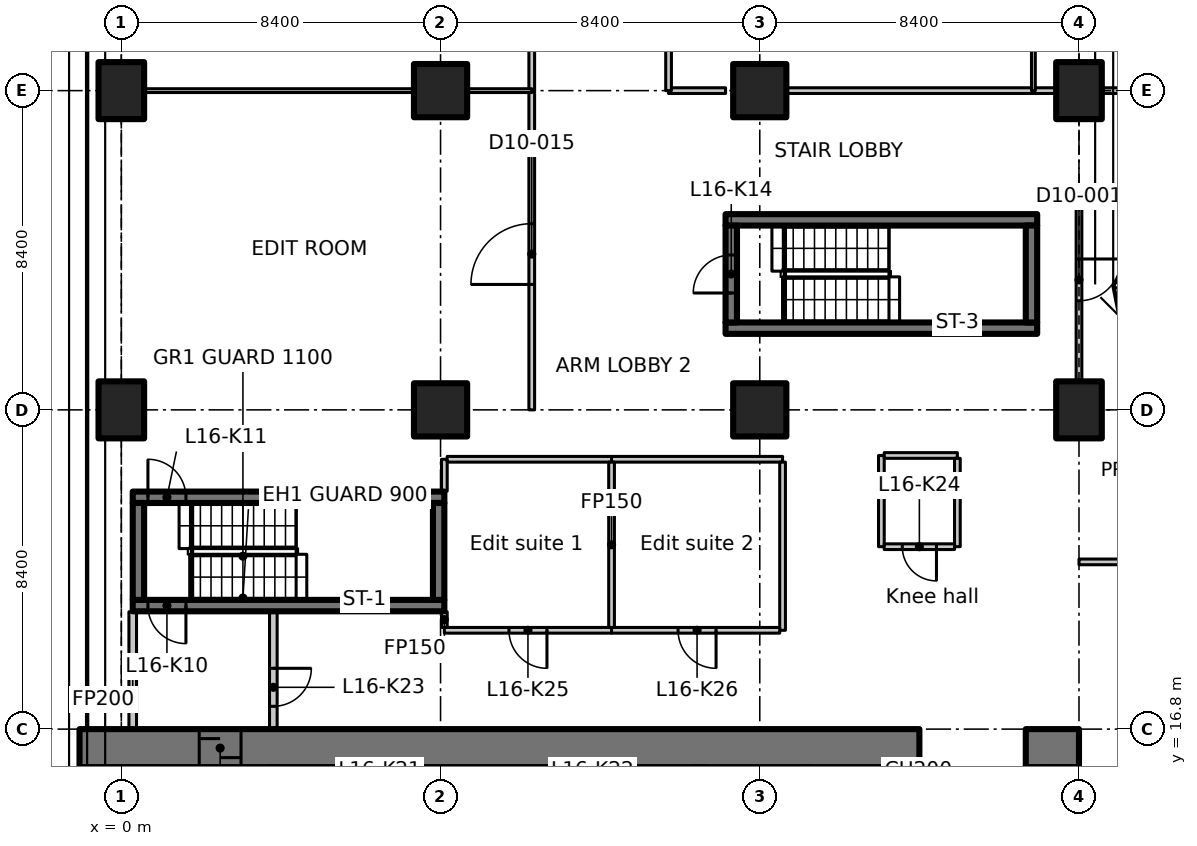
"""IFC4 building model, lengths in metres.
Left out: names, types, materials, properties, quantities, classifications, styles, units other than length and angle.
Written with IfcOpenShell. Run it as: python <this file> out.ifc"""

import sys

from ifc_helpers import new_model, si_unit, direction, frame, frame_2d, origin, origin_2d, place, context, subcontext, project, spatial, polyline, rectangle, outline, extrude, element, fill, save


model = new_model("IFC4")
c1 = context("Model", 3, precision=1e-05, world=origin(), true_north=direction((0.0, 1.0)))
c2 = subcontext(c1, "Body", "Model", "MODEL_VIEW")
j1 = project(units=[si_unit("LENGTHUNIT", "METRE"), si_unit("PLANEANGLEUNIT", "RADIAN")], contexts=[c1])
p1 = place(None, origin())
s1 = spatial("IfcSite", under=j1, at=p1, CompositionType="ELEMENT")
p2 = place(p1, origin())
s2 = spatial("IfcBuilding", under=s1, at=p2, CompositionType="ELEMENT")
p3 = place(p2, frame((0.0, 0.0, 72.5)))
s3 = spatial("IfcBuildingStorey", under=s2, at=p3, CompositionType="ELEMENT", Elevation=72.5)
for number, where, z_axis, x_axis in (
    (1, (0.0, 25.2, 0.0), (0.0, 0.0, 1.0), (1.0, 0.0, 0.0)),
    (2, (0.0, 33.6, 0.0), (0.0, 0.0, 1.0), (1.0, 0.0, 0.0)),
):
    element("IfcColumn", number, at=place(p3, frame(where, z_axis=z_axis, x_axis=x_axis)), inside=s3, PredefinedType="COLUMN", context=c2, shape_type="SweptSolid", body=[
        extrude(rectangle(XDim=1.2, YDim=1.5, at=origin_2d()), origin(), (0.0, 0.0, 1.0), 3.35),
    ])
for number, where, z_axis, x_axis in (
    (3, (8.4, 25.2, 0.0), (0.0, 0.0, 1.0), (1.0, 0.0, 0.0)),
    (4, (8.4, 33.6, 0.0), (0.0, 0.0, 1.0), (1.0, 0.0, 0.0)),
    (5, (16.8, 25.2, 0.0), (0.0, 0.0, 1.0), (1.0, 0.0, 0.0)),
    (6, (16.8, 33.6, 0.0), (0.0, 0.0, 1.0), (1.0, 0.0, 0.0)),
):
    element("IfcColumn", number, at=place(p3, frame(where, z_axis=z_axis, x_axis=x_axis)), inside=s3, PredefinedType="COLUMN", context=c2, shape_type="SweptSolid", body=[
        extrude(rectangle(XDim=1.4, YDim=1.4, at=origin_2d()), origin(), (0.0, 0.0, 1.0), 3.35),
    ])
for number, where, z_axis, x_axis in (
    (7, (25.2, 25.2, 0.0), (0.0, 0.0, 1.0), (1.0, 0.0, 0.0)),
    (8, (25.2, 33.6, 0.0), (0.0, 0.0, 1.0), (1.0, 0.0, 0.0)),
):
    element("IfcColumn", number, at=place(p3, frame(where, z_axis=z_axis, x_axis=x_axis)), inside=s3, PredefinedType="COLUMN", context=c2, shape_type="SweptSolid", body=[
        extrude(rectangle(XDim=1.2, YDim=1.5, at=origin_2d()), origin(), (0.0, 0.0, 1.0), 3.35),
    ])
p4 = place(p3, frame((-1.1, 16.3, 0.0), z_axis=(0.0, 0.0, 1.0), x_axis=(1.0, 0.0, 0.0)))
e9 = element("IfcWall", 9, at=p4, inside=s3, PredefinedType="SHEAR", context=c2, shape_type="SweptSolid", body=[
    extrude(rectangle(XDim=22.1, YDim=1.0, at=frame_2d((11.05, 0.0))), origin(), (0.0, 0.0, 1.0), 3.35),
])
p5 = place(p4, frame((3.15, 0.0, 0.0)))
e10 = element("IfcOpeningElement", 10, at=p5, cuts=e9, PredefinedType="OPENING", context=c2, shape_type="SweptSolid", body=[
    extrude(rectangle(XDim=1.1, YDim=2.3, at=frame_2d((0.55, 1.15))), frame((0.0, 0.51, 0.0), z_axis=(0.0, -1.0, 0.0), x_axis=(1.0, 0.0, 0.0)), (0.0, 0.0, 1.0), 1.02),
])
p6 = place(p3, frame((23.8, 16.3, 0.0), z_axis=(0.0, 0.0, 1.0), x_axis=(1.0, 0.0, 0.0)))
e11 = element("IfcWall", 11, at=p6, inside=s3, PredefinedType="SHEAR", context=c2, shape_type="SweptSolid", body=[
    extrude(rectangle(XDim=1.4, YDim=1.0, at=frame_2d((0.7, 0.0))), origin(), (0.0, 0.0, 1.0), 3.35),
])
p7 = place(p3, frame((24.7, 12.6, 0.0), z_axis=(0.0, 0.0, 1.0), x_axis=(0.0, 1.0, 0.0)))
e12 = element("IfcWall", 12, at=p7, inside=s3, PredefinedType="SHEAR", context=c2, shape_type="SweptSolid", body=[
    extrude(rectangle(XDim=3.2, YDim=1.0, at=frame_2d((1.6, 0.0))), origin(), (0.0, 0.0, 1.0), 3.35),
])
p8 = place(p3, frame((8.5, 20.05, 0.0), z_axis=(0.0, 0.0, 1.0), x_axis=(-1.0, 0.0, 0.0)))
e13 = element("IfcWall", 13, at=p8, inside=s3, PredefinedType="SHEAR", context=c2, shape_type="SweptSolid", body=[
    extrude(rectangle(XDim=8.2, YDim=0.3, at=frame_2d((4.1, 0.0))), origin(), (0.0, 0.0, 1.0), 3.35),
])
p9 = place(p8, frame((6.8, 0.0, 0.0)))
e14 = element("IfcOpeningElement", 14, at=p9, cuts=e13, PredefinedType="OPENING", context=c2, shape_type="SweptSolid", body=[
    extrude(rectangle(XDim=1.0, YDim=2.1, at=frame_2d((0.5, 1.05))), frame((0.0, 0.16, 0.0), z_axis=(0.0, -1.0, 0.0), x_axis=(1.0, 0.0, 0.0)), (0.0, 0.0, 1.0), 0.32),
])
p10 = place(p3, frame((0.3, 22.9, 0.0), z_axis=(0.0, 0.0, 1.0), x_axis=(1.0, 0.0, 0.0)))
e15 = element("IfcWall", 15, at=p10, inside=s3, PredefinedType="SHEAR", context=c2, shape_type="SweptSolid", body=[
    extrude(rectangle(XDim=8.2, YDim=0.3, at=frame_2d((4.1, 0.0))), origin(), (0.0, 0.0, 1.0), 3.35),
])
p11 = place(p10, frame((0.4, 0.0, 0.0)))
e16 = element("IfcOpeningElement", 16, at=p11, cuts=e15, PredefinedType="OPENING", context=c2, shape_type="SweptSolid", body=[
    extrude(rectangle(XDim=1.0, YDim=2.1, at=frame_2d((0.5, 1.05))), frame((0.0, 0.16, 0.0), z_axis=(0.0, -1.0, 0.0), x_axis=(1.0, 0.0, 0.0)), (0.0, 0.0, 1.0), 0.32),
])
for number, where, z_axis, x_axis in (
    (17, (0.45, 20.2, 0.0), (0.0, 0.0, 1.0), (0.0, 1.0, 0.0)),
    (18, (8.35, 20.2, 0.0), (0.0, 0.0, 1.0), (0.0, 1.0, 0.0)),
):
    element("IfcWall", number, at=place(p3, frame(where, z_axis=z_axis, x_axis=x_axis)), inside=s3, PredefinedType="SHEAR", context=c2, shape_type="SweptSolid", body=[
        extrude(rectangle(XDim=2.55, YDim=0.3, at=frame_2d((1.275, 0.0))), origin(), (0.0, 0.0, 1.0), 3.35),
    ])
for number, where, z_axis, x_axis in (
    (19, (15.9, 27.35, 0.0), (0.0, 0.0, 1.0), (1.0, 0.0, 0.0)),
    (20, (15.9, 30.2, 0.0), (0.0, 0.0, 1.0), (1.0, 0.0, 0.0)),
):
    element("IfcWall", number, at=place(p3, frame(where, z_axis=z_axis, x_axis=x_axis)), inside=s3, PredefinedType="SHEAR", context=c2, shape_type="SweptSolid", body=[
        extrude(rectangle(XDim=8.2, YDim=0.3, at=frame_2d((4.1, 0.0))), origin(), (0.0, 0.0, 1.0), 3.35),
    ])
p12 = place(p3, frame((16.05, 27.5, 0.0), z_axis=(0.0, 0.0, 1.0), x_axis=(0.0, 1.0, 0.0)))
e21 = element("IfcWall", 21, at=p12, inside=s3, PredefinedType="SHEAR", context=c2, shape_type="SweptSolid", body=[
    extrude(rectangle(XDim=2.55, YDim=0.3, at=frame_2d((1.275, 0.0))), origin(), (0.0, 0.0, 1.0), 3.35),
])
p13 = place(p12, frame((0.775, 0.0, 0.0)))
e22 = element("IfcOpeningElement", 22, at=p13, cuts=e21, PredefinedType="OPENING", context=c2, shape_type="SweptSolid", body=[
    extrude(rectangle(XDim=1.0, YDim=2.1, at=frame_2d((0.5, 1.05))), frame((0.0, 0.16, 0.0), z_axis=(0.0, -1.0, 0.0), x_axis=(1.0, 0.0, 0.0)), (0.0, 0.0, 1.0), 0.32),
])
p14 = place(p3, frame((23.95, 27.5, 0.0), z_axis=(0.0, 0.0, 1.0), x_axis=(0.0, 1.0, 0.0)))
e23 = element("IfcWall", 23, at=p14, inside=s3, PredefinedType="SHEAR", context=c2, shape_type="SweptSolid", body=[
    extrude(rectangle(XDim=2.55, YDim=0.3, at=frame_2d((1.275, 0.0))), origin(), (0.0, 0.0, 1.0), 3.35),
])
p15 = place(p3, frame((0.3, 16.812, 0.0), z_axis=(0.0, 0.0, 1.0), x_axis=(0.0, 1.0, 0.0)))
e24 = element("IfcWall", 24, at=p15, inside=s3, PredefinedType="PARTITIONING", context=c2, shape_type="SweptSolid", body=[
    extrude(rectangle(XDim=3.076, YDim=0.2, at=frame_2d((1.538, 0.0))), origin(), (0.0, 0.0, 1.0), 2.98),
])
p16 = place(p3, frame((4.0, 19.888, 0.0), z_axis=(0.0, 0.0, 1.0), x_axis=(0.0, -1.0, 0.0)))
e25 = element("IfcWall", 25, at=p16, inside=s3, PredefinedType="PARTITIONING", context=c2, shape_type="SweptSolid", body=[
    extrude(rectangle(XDim=3.076, YDim=0.2, at=frame_2d((1.538, 0.0))), origin(), (0.0, 0.0, 1.0), 3.35),
])
p17 = place(p16, frame((1.488, 0.0, 0.0)))
e26 = element("IfcOpeningElement", 26, at=p17, cuts=e25, PredefinedType="OPENING", context=c2, shape_type="SweptSolid", body=[
    extrude(rectangle(XDim=1.0, YDim=2.1, at=frame_2d((0.5, 1.05))), frame((0.0, 0.11, 0.0), z_axis=(0.0, -1.0, 0.0), x_axis=(1.0, 0.0, 0.0)), (0.0, 0.0, 1.0), 0.22),
])
p18 = place(p3, frame((12.9, 19.4, 0.0), z_axis=(0.0, 0.0, 1.0), x_axis=(-1.0, 0.0, 0.0)))
e27 = element("IfcWall", 27, at=p18, inside=s3, PredefinedType="PARTITIONING", context=c2, shape_type="SweptSolid", body=[
    extrude(rectangle(XDim=4.4, YDim=0.15, at=frame_2d((2.2, 0.0))), origin(), (0.0, 0.0, 1.0), 3.35),
])
p19 = place(p18, frame((1.7, 0.0, 0.0)))
e28 = element("IfcOpeningElement", 28, at=p19, cuts=e27, PredefinedType="OPENING", context=c2, shape_type="SweptSolid", body=[
    extrude(rectangle(XDim=1.0, YDim=2.1, at=frame_2d((0.5, 1.05))), frame((0.0, 0.085, 0.0), z_axis=(0.0, -1.0, 0.0), x_axis=(1.0, 0.0, 0.0)), (0.0, 0.0, 1.0), 0.17),
])
p20 = place(p3, frame((8.5, 19.475, 0.0), z_axis=(0.0, 0.0, 1.0), x_axis=(0.0, 1.0, 0.0)))
e29 = element("IfcWall", 29, at=p20, inside=s3, PredefinedType="PARTITIONING", context=c2, shape_type="SweptSolid", body=[
    extrude(rectangle(XDim=0.413, YDim=0.15, at=frame_2d((0.207, 0.0))), origin(), (0.0, 0.0, 1.0), 3.35),
])
p21 = place(p3, frame((8.5, 23.062, 0.0), z_axis=(0.0, 0.0, 1.0), x_axis=(0.0, 1.0, 0.0)))
e30 = element("IfcWall", 30, at=p21, inside=s3, PredefinedType="PARTITIONING", context=c2, shape_type="SweptSolid", body=[
    extrude(rectangle(XDim=0.838, YDim=0.15, at=frame_2d((0.419, 0.0))), origin(), (0.0, 0.0, 1.0), 3.35),
])
p22 = place(p3, frame((8.575, 23.9, 0.0), z_axis=(0.0, 0.0, 1.0), x_axis=(1.0, 0.0, 0.0)))
e31 = element("IfcWall", 31, at=p22, inside=s3, PredefinedType="PARTITIONING", context=c2, shape_type="SweptSolid", body=[
    extrude(rectangle(XDim=4.325, YDim=0.15, at=frame_2d((2.163, 0.0))), origin(), (0.0, 0.0, 1.0), 3.35),
])
p23 = place(p3, frame((12.9, 23.9, 0.0), z_axis=(0.0, 0.0, 1.0), x_axis=(1.0, 0.0, 0.0)))
e32 = element("IfcWall", 32, at=p23, inside=s3, PredefinedType="PARTITIONING", context=c2, shape_type="SweptSolid", body=[
    extrude(rectangle(XDim=4.5, YDim=0.15, at=frame_2d((2.25, 0.0))), origin(), (0.0, 0.0, 1.0), 3.35),
])
p24 = place(p3, frame((17.4, 23.825, 0.0), z_axis=(0.0, 0.0, 1.0), x_axis=(0.0, -1.0, 0.0)))
e33 = element("IfcWall", 33, at=p24, inside=s3, PredefinedType="PARTITIONING", context=c2, shape_type="SweptSolid", body=[
    extrude(rectangle(XDim=4.425, YDim=0.15, at=frame_2d((2.212, 0.0))), origin(), (0.0, 0.0, 1.0), 3.35),
])
p25 = place(p3, frame((17.325, 19.4, 0.0), z_axis=(0.0, 0.0, 1.0), x_axis=(-1.0, 0.0, 0.0)))
e34 = element("IfcWall", 34, at=p25, inside=s3, PredefinedType="PARTITIONING", context=c2, shape_type="SweptSolid", body=[
    extrude(rectangle(XDim=4.425, YDim=0.15, at=frame_2d((2.212, 0.0))), origin(), (0.0, 0.0, 1.0), 3.35),
])
p26 = place(p25, frame((1.675, 0.0, 0.0)))
e35 = element("IfcOpeningElement", 35, at=p26, cuts=e34, PredefinedType="OPENING", context=c2, shape_type="SweptSolid", body=[
    extrude(rectangle(XDim=1.0, YDim=2.1, at=frame_2d((0.5, 1.05))), frame((0.0, 0.085, 0.0), z_axis=(0.0, -1.0, 0.0), x_axis=(1.0, 0.0, 0.0)), (0.0, 0.0, 1.0), 0.17),
])
p27 = place(p3, frame((12.9, 23.825, 0.0), z_axis=(0.0, 0.0, 1.0), x_axis=(0.0, -1.0, 0.0)))
e36 = element("IfcWall", 36, at=p27, inside=s3, PredefinedType="PARTITIONING", context=c2, shape_type="SweptSolid", body=[
    extrude(rectangle(XDim=4.35, YDim=0.15, at=frame_2d((2.175, 0.0))), origin(), (0.0, 0.0, 1.0), 3.35),
])
p28 = place(p3, frame((20.0, 21.6, 0.0), z_axis=(0.0, 0.0, 1.0), x_axis=(0.0, 1.0, 0.0)))
e37 = element("IfcWall", 37, at=p28, inside=s3, PredefinedType="PARTITIONING", context=c2, shape_type="SweptSolid", body=[
    extrude(rectangle(XDim=2.4, YDim=0.15, at=frame_2d((1.2, 0.0))), origin(), (0.0, 0.0, 1.0), 3.35),
])
p29 = place(p3, frame((20.075, 24.0, 0.0), z_axis=(0.0, 0.0, 1.0), x_axis=(1.0, 0.0, 0.0)))
e38 = element("IfcWall", 38, at=p29, inside=s3, PredefinedType="PARTITIONING", context=c2, shape_type="SweptSolid", body=[
    extrude(rectangle(XDim=1.925, YDim=0.15, at=frame_2d((0.962, 0.0))), origin(), (0.0, 0.0, 1.0), 3.35),
])
p30 = place(p3, frame((22.0, 23.925, 0.0), z_axis=(0.0, 0.0, 1.0), x_axis=(0.0, -1.0, 0.0)))
e39 = element("IfcWall", 39, at=p30, inside=s3, PredefinedType="PARTITIONING", context=c2, shape_type="SweptSolid", body=[
    extrude(rectangle(XDim=2.325, YDim=0.15, at=frame_2d((1.163, 0.0))), origin(), (0.0, 0.0, 1.0), 3.35),
])
p31 = place(p3, frame((21.925, 21.6, 0.0), z_axis=(0.0, 0.0, 1.0), x_axis=(-1.0, 0.0, 0.0)))
e40 = element("IfcWall", 40, at=p31, inside=s3, PredefinedType="PARTITIONING", context=c2, shape_type="SweptSolid", body=[
    extrude(rectangle(XDim=1.85, YDim=0.15, at=frame_2d((0.925, 0.0))), origin(), (0.0, 0.0, 1.0), 3.35),
])
p32 = place(p31, frame((0.475, 0.0, 0.0)))
e41 = element("IfcOpeningElement", 41, at=p32, cuts=e40, PredefinedType="OPENING", context=c2, shape_type="SweptSolid", body=[
    extrude(rectangle(XDim=0.9, YDim=2.1, at=frame_2d((0.45, 1.05))), frame((0.0, 0.085, 0.0), z_axis=(0.0, -1.0, 0.0), x_axis=(1.0, 0.0, 0.0)), (0.0, 0.0, 1.0), 0.17),
])
p33 = place(p3, frame((25.2, 21.2, 0.0), z_axis=(0.0, 0.0, 1.0), x_axis=(1.0, 0.0, 0.0)))
e42 = element("IfcWall", 42, at=p33, inside=s3, PredefinedType="PARTITIONING", context=c2, shape_type="SweptSolid", body=[
    extrude(rectangle(XDim=4.2, YDim=0.15, at=frame_2d((2.1, 0.0))), origin(), (0.0, 0.0, 1.0), 3.33),
])
p34 = place(p3, frame((25.2, 31.0, 0.0), z_axis=(0.0, 0.0, 1.0), x_axis=(0.0, -1.0, 0.0)))
e43 = element("IfcWall", 43, at=p34, inside=s3, PredefinedType="PARTITIONING", context=c2, shape_type="SweptSolid", body=[
    extrude(outline(polyline([(0.0, 0.0), (5.03, 0.0), (5.03, 2.98), (0.0, 2.98), (0.0, 0.0)])), frame((0.0, 0.075, 0.0), z_axis=(0.0, -1.0, 0.0), x_axis=(1.0, 0.0, 0.0)), (0.0, 0.0, 1.0), 0.15),
])
p35 = place(p34, frame((1.83, 0.0, 0.0)))
e44 = element("IfcOpeningElement", 44, at=p35, cuts=e43, PredefinedType="OPENING", context=c2, shape_type="SweptSolid", body=[
    extrude(rectangle(XDim=1.1, YDim=2.1, at=frame_2d((0.55, 1.05))), frame((0.0, 0.085, 0.0), z_axis=(0.0, -1.0, 0.0), x_axis=(1.0, 0.0, 0.0)), (0.0, 0.0, 1.0), 0.17),
])
p36 = place(p3, frame((25.2, 31.0, 0.0), z_axis=(0.0, 0.0, 1.0), x_axis=(1.0, 0.0, 0.0)))
e45 = element("IfcWall", 45, at=p36, inside=s3, PredefinedType="PARTITIONING", context=c2, shape_type="SweptSolid", body=[
    extrude(rectangle(XDim=3.324, YDim=0.15, at=frame_2d((1.662, 0.0))), origin(), (0.0, 0.0, 1.0), 2.98),
])
p37 = place(p3, frame((10.8, 25.2, 0.0), z_axis=(0.0, 0.0, 1.0), x_axis=(0.0, 1.0, 0.0)))
e46 = element("IfcWall", 46, at=p37, inside=s3, PredefinedType="PARTITIONING", context=c2, shape_type="SweptSolid", body=[
    extrude(rectangle(XDim=8.4, YDim=0.15, at=frame_2d((4.2, 0.0))), origin(), (0.0, 0.0, 1.0), 3.33),
])
p38 = place(p37, frame((3.3, 0.0, 0.0)))
e47 = element("IfcOpeningElement", 47, at=p38, cuts=e46, PredefinedType="OPENING", context=c2, shape_type="SweptSolid", body=[
    extrude(rectangle(XDim=1.6, YDim=2.1, at=frame_2d((0.8, 1.05))), frame((0.0, 0.085, 0.0), z_axis=(0.0, -1.0, 0.0), x_axis=(1.0, 0.0, 0.0)), (0.0, 0.0, 1.0), 0.17),
])
p39 = place(p3, frame((14.4, 33.6, 0.0), z_axis=(0.0, 0.0, 1.0), x_axis=(1.0, 0.0, 0.0)))
e48 = element("IfcWall", 48, at=p39, inside=s3, PredefinedType="PARTITIONING", context=c2, shape_type="SweptSolid", body=[
    extrude(rectangle(XDim=1.5, YDim=0.15, at=frame_2d((0.75, 0.0))), origin(), (0.0, 0.0, 1.0), 3.33),
])
p40 = place(p3, frame((17.52, 33.6, 0.0), z_axis=(0.0, 0.0, 1.0), x_axis=(1.0, 0.0, 0.0)))
e49 = element("IfcWall", 49, at=p40, inside=s3, PredefinedType="PARTITIONING", context=c2, shape_type="SweptSolid", body=[
    extrude(rectangle(XDim=6.48, YDim=0.15, at=frame_2d((3.24, 0.0))), origin(), (0.0, 0.0, 1.0), 3.33),
])
p41 = place(p3, frame((24.0, 33.6, 0.0), z_axis=(0.0, 0.0, 1.0), x_axis=(1.0, 0.0, 0.0)))
e50 = element("IfcWall", 50, at=p41, inside=s3, PredefinedType="PARTITIONING", context=c2, shape_type="SweptSolid", body=[
    extrude(rectangle(XDim=0.58, YDim=0.15, at=frame_2d((0.29, 0.0))), origin(), (0.0, 0.0, 1.0), 3.33),
])
p42 = place(p3, frame((25.82, 33.6, 0.0), z_axis=(0.0, 0.0, 1.0), x_axis=(1.0, 0.0, 0.0)))
e51 = element("IfcWall", 51, at=p42, inside=s3, PredefinedType="PARTITIONING", context=c2, shape_type="SweptSolid", body=[
    extrude(rectangle(XDim=3.942, YDim=0.15, at=frame_2d((1.971, 0.0))), origin(), (0.0, 0.0, 1.0), 2.98),
])
p43 = place(p3, frame((10.8, 33.6, 0.0), z_axis=(0.0, 0.0, 1.0), x_axis=(0.0, 1.0, 0.0)))
e52 = element("IfcWall", 52, at=p43, inside=s3, PredefinedType="PARTITIONING", context=c2, shape_type="SweptSolid", body=[
    extrude(rectangle(XDim=8.4, YDim=0.15, at=frame_2d((4.2, 0.0))), origin(), (0.0, 0.0, 1.0), 3.33),
])
p44 = place(p43, frame((3.3, 0.0, 0.0)))
e53 = element("IfcOpeningElement", 53, at=p44, cuts=e52, PredefinedType="OPENING", context=c2, shape_type="SweptSolid", body=[
    extrude(rectangle(XDim=1.6, YDim=2.1, at=frame_2d((0.8, 1.05))), frame((0.0, 0.085, 0.0), z_axis=(0.0, -1.0, 0.0), x_axis=(1.0, 0.0, 0.0)), (0.0, 0.0, 1.0), 0.17),
])
p45 = place(p3, frame((14.4, 37.8, 0.0), z_axis=(0.0, 0.0, 1.0), x_axis=(0.0, -1.0, 0.0)))
e54 = element("IfcWall", 54, at=p45, inside=s3, PredefinedType="PARTITIONING", context=c2, shape_type="SweptSolid", body=[
    extrude(rectangle(XDim=4.2, YDim=0.15, at=frame_2d((2.1, 0.0))), origin(), (0.0, 0.0, 1.0), 3.33),
])
p46 = place(p3, frame((0.62, 33.6, 0.0), z_axis=(0.0, 0.0, 1.0), x_axis=(1.0, 0.0, 0.0)))
e55 = element("IfcWall", 55, at=p46, inside=s3, PredefinedType="PARTITIONING", context=c2, shape_type="SweptSolid", body=[
    extrude(rectangle(XDim=7.06, YDim=0.1, at=frame_2d((3.53, 0.0))), origin(), (0.0, 0.0, 1.0), 3.33),
])
p47 = place(p3, frame((9.12, 33.6, 0.0), z_axis=(0.0, 0.0, 1.0), x_axis=(1.0, 0.0, 0.0)))
e56 = element("IfcWall", 56, at=p47, inside=s3, PredefinedType="PARTITIONING", context=c2, shape_type="SweptSolid", body=[
    extrude(rectangle(XDim=1.68, YDim=0.1, at=frame_2d((0.84, 0.0))), origin(), (0.0, 0.0, 1.0), 3.33),
])
p48 = place(p3, frame((24.0, 37.8, 0.0), z_axis=(0.0, 0.0, 1.0), x_axis=(0.0, -1.0, 0.0)))
e57 = element("IfcWall", 57, at=p48, inside=s3, PredefinedType="PARTITIONING", context=c2, shape_type="SweptSolid", body=[
    extrude(rectangle(XDim=4.2, YDim=0.1, at=frame_2d((2.1, 0.0))), origin(), (0.0, 0.0, 1.0), 3.33),
])
p49 = place(p5, origin())
e58 = element("IfcDoor", 58, at=p49, inside=s3, OperationType="SLIDING_TO_LEFT", PredefinedType="DOOR", context=c2, shape_type="SweptSolid", body=[
    extrude(rectangle(XDim=1.1, YDim=2.3, at=frame_2d((0.55, 1.15))), frame((0.0, 0.025, 0.0), z_axis=(0.0, -1.0, 0.0), x_axis=(1.0, 0.0, 0.0)), (0.0, 0.0, 1.0), 0.05),
])
fill(e10, e58)
p50 = place(p9, origin())
e59 = element("IfcDoor", 59, at=p50, inside=s3, OperationType="SINGLE_SWING_LEFT", PredefinedType="DOOR", context=c2, shape_type="SweptSolid", body=[
    extrude(rectangle(XDim=1.0, YDim=2.1, at=frame_2d((0.5, 1.05))), frame((0.0, 0.025, 0.0), z_axis=(0.0, -1.0, 0.0), x_axis=(1.0, 0.0, 0.0)), (0.0, 0.0, 1.0), 0.05),
])
fill(e14, e59)
p51 = place(p11, origin())
e60 = element("IfcDoor", 60, at=p51, inside=s3, OperationType="SINGLE_SWING_RIGHT", PredefinedType="DOOR", context=c2, shape_type="SweptSolid", body=[
    extrude(rectangle(XDim=1.0, YDim=2.1, at=frame_2d((0.5, 1.05))), frame((0.0, 0.025, 0.0), z_axis=(0.0, -1.0, 0.0), x_axis=(1.0, 0.0, 0.0)), (0.0, 0.0, 1.0), 0.05),
])
fill(e16, e60)
p52 = place(p13, origin())
e61 = element("IfcDoor", 61, at=p52, inside=s3, OperationType="SINGLE_SWING_LEFT", PredefinedType="DOOR", context=c2, shape_type="SweptSolid", body=[
    extrude(rectangle(XDim=1.0, YDim=2.1, at=frame_2d((0.5, 1.05))), frame((0.0, 0.025, 0.0), z_axis=(0.0, -1.0, 0.0), x_axis=(1.0, 0.0, 0.0)), (0.0, 0.0, 1.0), 0.05),
])
fill(e22, e61)
p53 = place(p17, origin())
e62 = element("IfcDoor", 62, at=p53, inside=s3, OperationType="SINGLE_SWING_RIGHT", PredefinedType="DOOR", context=c2, shape_type="SweptSolid", body=[
    extrude(rectangle(XDim=1.0, YDim=2.1, at=frame_2d((0.5, 1.05))), frame((0.0, 0.025, 0.0), z_axis=(0.0, -1.0, 0.0), x_axis=(1.0, 0.0, 0.0)), (0.0, 0.0, 1.0), 0.05),
])
fill(e26, e62)
p54 = place(p32, origin())
e63 = element("IfcDoor", 63, at=p54, inside=s3, OperationType="SINGLE_SWING_LEFT", PredefinedType="DOOR", context=c2, shape_type="SweptSolid", body=[
    extrude(rectangle(XDim=0.9, YDim=2.1, at=frame_2d((0.45, 1.05))), frame((0.0, 0.025, 0.0), z_axis=(0.0, -1.0, 0.0), x_axis=(1.0, 0.0, 0.0)), (0.0, 0.0, 1.0), 0.05),
])
fill(e41, e63)
p55 = place(p19, origin())
e64 = element("IfcDoor", 64, at=p55, inside=s3, OperationType="SINGLE_SWING_RIGHT", PredefinedType="DOOR", context=c2, shape_type="SweptSolid", body=[
    extrude(rectangle(XDim=1.0, YDim=2.1, at=frame_2d((0.5, 1.05))), frame((0.0, 0.025, 0.0), z_axis=(0.0, -1.0, 0.0), x_axis=(1.0, 0.0, 0.0)), (0.0, 0.0, 1.0), 0.05),
])
fill(e28, e64)
p56 = place(p26, origin())
e65 = element("IfcDoor", 65, at=p56, inside=s3, OperationType="SINGLE_SWING_LEFT", PredefinedType="DOOR", context=c2, shape_type="SweptSolid", body=[
    extrude(rectangle(XDim=1.0, YDim=2.1, at=frame_2d((0.5, 1.05))), frame((0.0, 0.025, 0.0), z_axis=(0.0, -1.0, 0.0), x_axis=(1.0, 0.0, 0.0)), (0.0, 0.0, 1.0), 0.05),
])
fill(e35, e65)
p57 = place(p35, origin())
e66 = element("IfcDoor", 66, at=p57, inside=s3, OperationType="SINGLE_SWING_RIGHT", PredefinedType="DOOR", context=c2, shape_type="SweptSolid", body=[
    extrude(rectangle(XDim=1.1, YDim=2.1, at=frame_2d((0.55, 1.05))), frame((0.0, 0.025, 0.0), z_axis=(0.0, -1.0, 0.0), x_axis=(1.0, 0.0, 0.0)), (0.0, 0.0, 1.0), 0.05),
])
fill(e44, e66)
p58 = place(p38, origin())
e67 = element("IfcDoor", 67, at=p58, inside=s3, OperationType="DOUBLE_DOOR_SINGLE_SWING", PredefinedType="DOOR", context=c2, shape_type="SweptSolid", body=[
    extrude(rectangle(XDim=1.6, YDim=2.1, at=frame_2d((0.8, 1.05))), frame((0.0, 0.025, 0.0), z_axis=(0.0, -1.0, 0.0), x_axis=(1.0, 0.0, 0.0)), (0.0, 0.0, 1.0), 0.05),
])
fill(e47, e67)
save(model, sys.argv[1])
